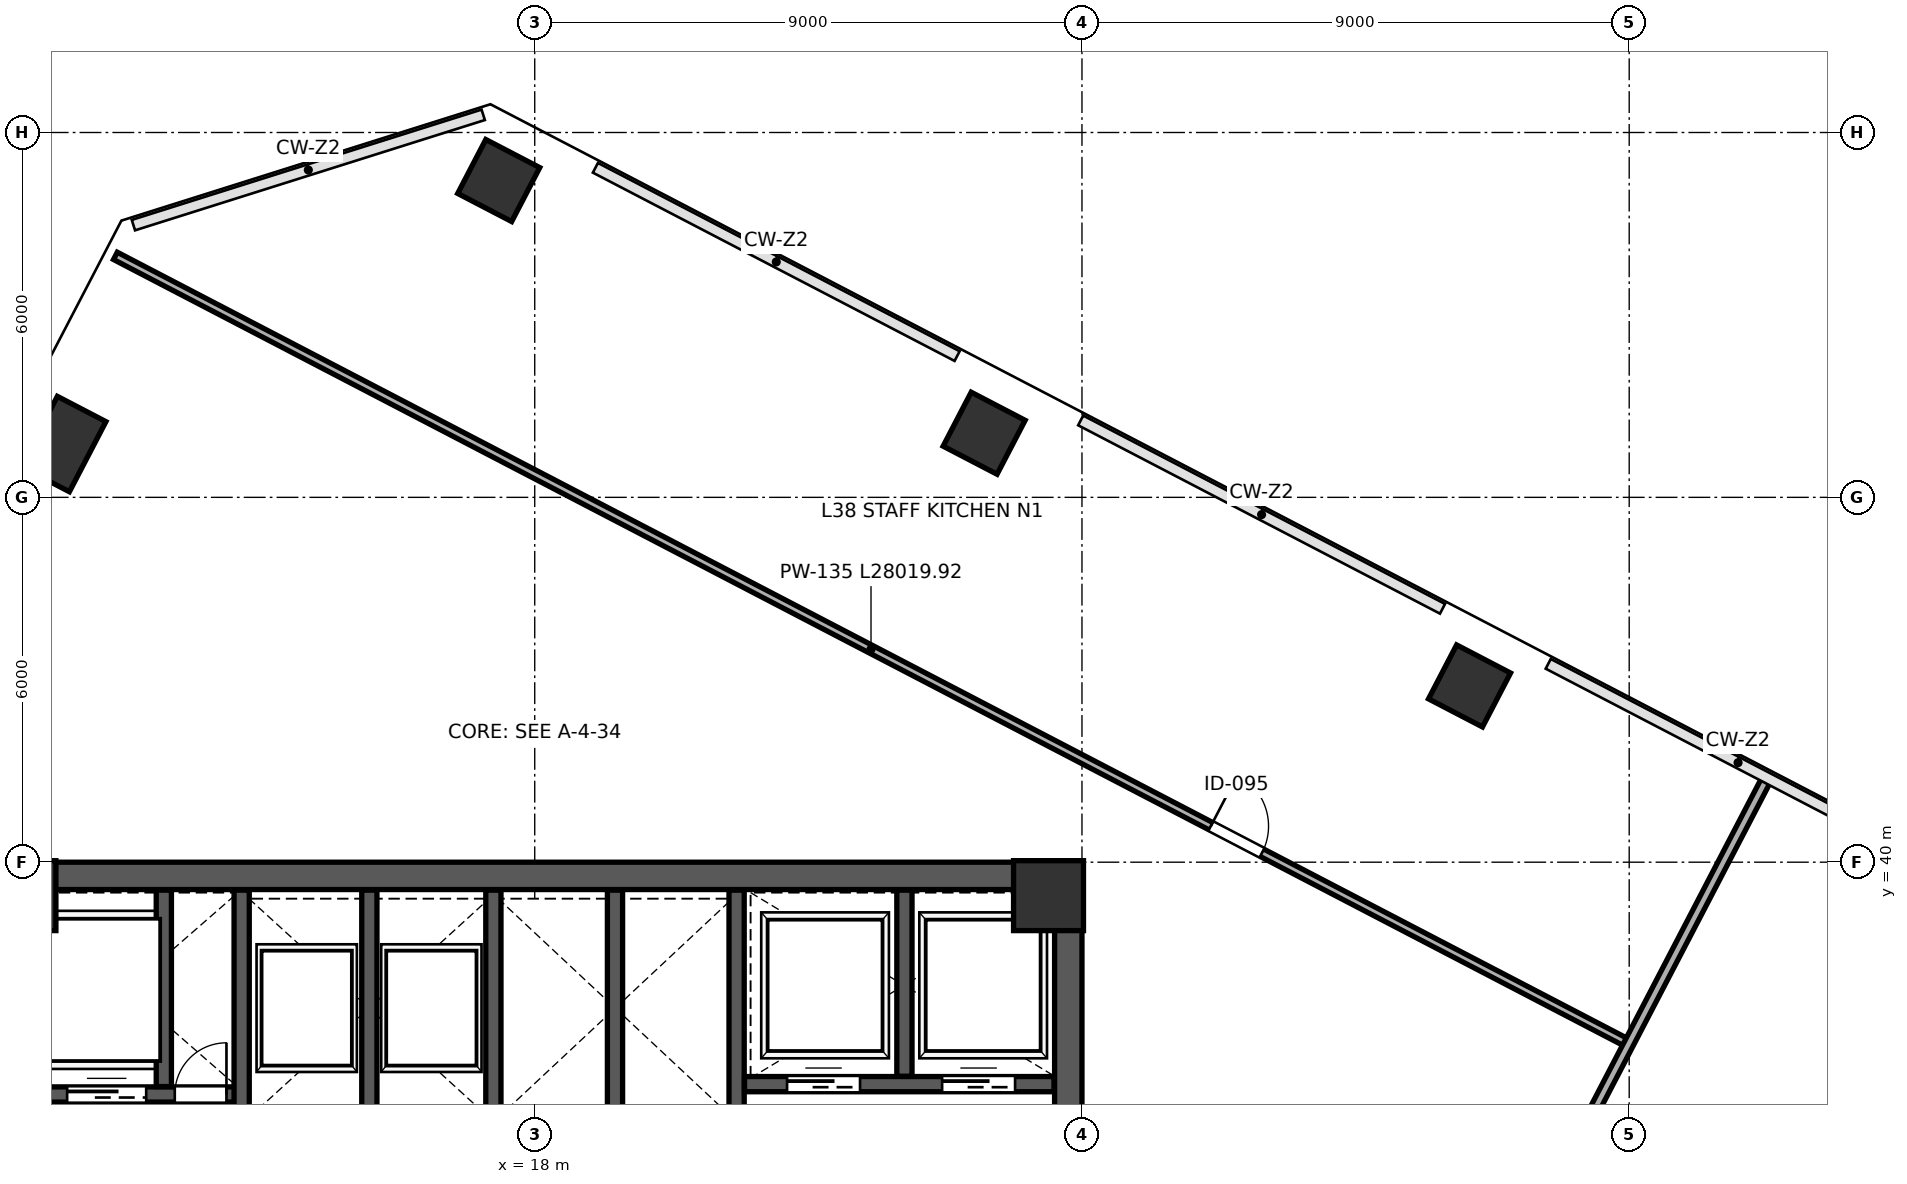
"""IFC4 building model, lengths in metres.
Left out: names, types, materials, properties, quantities, classifications, styles, units other than length and angle.
Written with IfcOpenShell. Run it as: python <this file> out.ifc"""

import sys

from ifc_helpers import new_model, si_unit, direction, frame, frame_2d, origin, origin_2d, place, context, subcontext, project, spatial, rectangle, extrude, clip, halfspace, source, transform, mapped, element, fill, save


model = new_model("IFC4")
c1 = context("Model", 3, precision=1e-05, world=origin(), true_north=direction((0.0, 1.0)))
c2 = subcontext(c1, "Body", "Model", "MODEL_VIEW")
j1 = project(units=[si_unit("LENGTHUNIT", "METRE"), si_unit("PLANEANGLEUNIT", "RADIAN")], contexts=[c1])
p1 = place(None, origin())
s1 = spatial("IfcSite", under=j1, at=p1, CompositionType="ELEMENT")
p2 = place(p1, origin())
s2 = spatial("IfcBuilding", under=s1, at=p2, CompositionType="ELEMENT")
p3 = place(p2, frame((0.0, 0.0, 170.8)))
s3 = spatial("IfcBuildingStorey", under=s2, at=p3, CompositionType="ELEMENT", Elevation=170.8)
m1 = source(origin(), c2, "Body", "SweptSolid", [
    extrude(rectangle(XDim=1.15, YDim=1.15, at=origin_2d()), origin(), (0.0, 0.0, 1.0), 4.198),
])
for number, where, z_axis, x_axis in (
    (1, (9.55, 39.45, 0.001), (0.0, 0.0, 1.0), (1.0, 0.0, 0.0)),
    (2, (26.45, 39.45, 0.001), (0.0, 0.0, 1.0), (1.0, 0.0, 0.0)),
):
    element("IfcColumn", number, at=place(p3, frame(where, z_axis=z_axis, x_axis=x_axis)), inside=s3, PredefinedType="COLUMN", context=c2, shape_type="MappedRepresentation", body=[
        mapped(m1, transform((0.0, 0.0, 0.0), scale=1.0)),
    ])
p4 = place(p3, frame((17.408, 51.21, 0.0), z_axis=(0.099466506069, 0.020066789306, 0.994838548779), x_axis=(-0.274877965566, -0.960336826175, 0.046853861504)))
e3 = element("IfcColumn", 3, at=p4, inside=s3, PredefinedType="COLUMN", context=c2, shape_type="Clipping", body=[
    clip(clip(extrude(rectangle(XDim=1.0, YDim=1.0, at=origin_2d()), origin(), (0.0, 0.0, 1.0), 4.222), halfspace(frame((0.0, 0.0, 0.07), z_axis=(0.0, 0.0, -1.0), x_axis=(1.0, 0.0, 0.0)), False)), halfspace(frame((0.0, 0.0, 4.152), z_axis=(0.0, 0.0, 1.0), x_axis=(1.0, 0.0, 0.0)), False)),
])
p5 = place(p3, frame((25.391, 47.054, 0.0), z_axis=(0.07769866338, -0.020974583254, 0.996756231265), x_axis=(-0.675517121547, -0.736407253152, 0.037161485459)))
e4 = element("IfcColumn", 4, at=p5, inside=s3, PredefinedType="COLUMN", context=c2, shape_type="Clipping", body=[
    clip(clip(extrude(rectangle(XDim=1.0, YDim=1.0, at=origin_2d()), origin(), (0.0, 0.0, 1.0), 4.214), halfspace(frame((0.0, 0.0, 0.055), z_axis=(0.0, 0.0, -1.0), x_axis=(1.0, 0.0, 0.0)), False)), halfspace(frame((0.0, 0.0, 4.158), z_axis=(0.0, 0.0, 1.0), x_axis=(1.0, 0.0, 0.0)), False)),
])
p6 = place(p3, frame((33.374, 42.899, 0.0), z_axis=(0.055725496021, -0.062097434235, 0.996513210025), x_axis=(-0.96748864065, -0.2499629432, 0.038526059245)))
e5 = element("IfcColumn", 5, at=p6, inside=s3, PredefinedType="COLUMN", context=c2, shape_type="Clipping", body=[
    clip(clip(extrude(rectangle(XDim=1.0, YDim=1.0, at=origin_2d()), origin(), (0.0, 0.0, 1.0), 4.215), halfspace(frame((0.0, 0.0, 0.057), z_axis=(0.0, 0.0, -1.0), x_axis=(1.0, 0.0, 0.0)), False)), halfspace(frame((0.0, 0.0, 4.157), z_axis=(0.0, 0.0, 1.0), x_axis=(1.0, 0.0, 0.0)), False)),
])
p7 = place(p3, frame((10.248, 46.877, 0.0), z_axis=(0.077588163399, 0.057279852174, 0.995338683783), x_axis=(0.157076232166, -0.986581975739, 0.044531589179)))
e6 = element("IfcColumn", 6, at=p7, inside=s3, PredefinedType="PILASTER", context=c2, shape_type="Clipping", body=[
    clip(clip(extrude(rectangle(XDim=0.9, YDim=1.3, at=origin_2d()), origin(), (0.0, 0.0, 1.0), 4.22), halfspace(frame((0.0, 0.0, 0.077), z_axis=(0.0, 0.0, -1.0), x_axis=(1.0, 0.0, 0.0)), False)), halfspace(frame((0.0, 0.0, 4.143), z_axis=(0.0, 0.0, 1.0), x_axis=(1.0, 0.0, 0.0)), False)),
])
p8 = place(p3, frame((26.775, 24.45, 0.0), z_axis=(0.0, 0.0, 1.0), x_axis=(0.0, 1.0, 0.0)))
e7 = element("IfcWall", 7, at=p8, inside=s3, PredefinedType="SHEAR", context=c2, shape_type="SweptSolid", body=[
    extrude(rectangle(XDim=15.1, YDim=0.45, at=frame_2d((7.55, 0.0))), origin(), (0.0, 0.0, 1.0), 3.96),
])
p9 = place(p8, frame((8.6, 0.0, 0.0)))
e8 = element("IfcOpeningElement", 8, at=p9, cuts=e7, PredefinedType="OPENING", context=c2, shape_type="SweptSolid", body=[
    extrude(rectangle(XDim=1.15, YDim=2.2, at=frame_2d((0.575, 1.1))), frame((0.0, 0.235, 0.0), z_axis=(0.0, -1.0, 0.0), x_axis=(1.0, 0.0, 0.0)), (0.0, 0.0, 1.0), 0.47),
])
p10 = place(p3, frame((9.0, 39.775, 0.0), z_axis=(0.0, 0.0, 1.0), x_axis=(1.0, 0.0, 0.0)))
e9 = element("IfcWall", 9, at=p10, inside=s3, PredefinedType="SHEAR", context=c2, shape_type="SweptSolid", body=[
    extrude(rectangle(XDim=18.0, YDim=0.45, at=frame_2d((9.0, 0.0))), origin(), (0.0, 0.0, 1.0), 3.96),
])
p11 = place(p3, frame((21.32, 32.12, 0.0), z_axis=(0.0, 0.0, 1.0), x_axis=(0.0, 1.0, 0.0)))
e10 = element("IfcWall", 10, at=p11, inside=s3, PredefinedType="SHEAR", context=c2, shape_type="SweptSolid", body=[
    extrude(rectangle(XDim=7.42, YDim=0.25, at=frame_2d((3.71, 0.0))), origin(), (0.0, 0.0, 1.0), 3.96),
])
p12 = place(p11, frame((1.4, 0.0, 0.0)))
e11 = element("IfcOpeningElement", 11, at=p12, cuts=e10, PredefinedType="OPENING", context=c2, shape_type="SweptSolid", body=[
    extrude(rectangle(XDim=1.15, YDim=2.2, at=frame_2d((0.575, 1.1))), frame((0.0, 0.135, 0.0), z_axis=(0.0, -1.0, 0.0), x_axis=(1.0, 0.0, 0.0)), (0.0, 0.0, 1.0), 0.27),
])
p13 = place(p3, frame((9.46, 36.18, 0.0), z_axis=(0.0, 0.0, 1.0), x_axis=(1.0, 0.0, 0.0)))
e12 = element("IfcWall", 12, at=p13, inside=s3, PredefinedType="SHEAR", context=c2, shape_type="SweptSolid", body=[
    extrude(rectangle(XDim=3.79, YDim=0.25, at=frame_2d((1.895, 0.0))), origin(), (0.0, 0.0, 1.0), 3.96),
])
p14 = place(p13, frame((2.62, 0.0, 0.0)))
e13 = element("IfcOpeningElement", 13, at=p14, cuts=e12, PredefinedType="OPENING", context=c2, shape_type="SweptSolid", body=[
    extrude(rectangle(XDim=0.85, YDim=2.1, at=frame_2d((0.425, 1.05))), frame((0.0, 0.135, 0.0), z_axis=(0.0, -1.0, 0.0), x_axis=(1.0, 0.0, 0.0)), (0.0, 0.0, 1.0), 0.27),
])
p15 = place(p13, frame((0.85, 0.0, 0.0)))
e14 = element("IfcOpeningElement", 14, at=p15, cuts=e12, PredefinedType="OPENING", context=c2, shape_type="SweptSolid", body=[
    extrude(rectangle(XDim=1.3, YDim=2.25, at=frame_2d((0.65, 1.125))), frame((0.0, 0.135, 0.0), z_axis=(0.0, -1.0, 0.0), x_axis=(1.0, 0.0, 0.0)), (0.0, 0.0, 1.0), 0.27),
])
p16 = place(p3, frame((11.9, 36.31, 0.0), z_axis=(0.0, 0.0, 1.0), x_axis=(0.0, 1.0, 0.0)))
e15 = element("IfcWall", 15, at=p16, inside=s3, PredefinedType="SHEAR", context=c2, shape_type="SweptSolid", body=[
    extrude(rectangle(XDim=3.23, YDim=0.25, at=frame_2d((1.615, 0.0))), origin(), (0.0, 0.0, 1.0), 3.96),
])
p17 = place(p3, frame((21.45, 36.35, 0.0), z_axis=(0.0, 0.0, 1.0), x_axis=(1.0, 0.0, 0.0)))
e16 = element("IfcWall", 16, at=p17, inside=s3, PredefinedType="SHEAR", context=c2, shape_type="SweptSolid", body=[
    extrude(rectangle(XDim=5.09, YDim=0.25, at=frame_2d((2.545, 0.0))), origin(), (0.0, 0.0, 1.0), 3.96),
])
p18 = place(p17, frame((0.7, 0.0, 0.0)))
e17 = element("IfcOpeningElement", 17, at=p18, cuts=e16, PredefinedType="OPENING", context=c2, shape_type="SweptSolid", body=[
    extrude(rectangle(XDim=1.2, YDim=2.2, at=frame_2d((0.6, 1.1))), frame((0.0, 0.135, 0.0), z_axis=(0.0, -1.0, 0.0), x_axis=(1.0, 0.0, 0.0)), (0.0, 0.0, 1.0), 0.27),
])
p19 = place(p17, frame((3.25, 0.0, 0.0)))
e18 = element("IfcOpeningElement", 18, at=p19, cuts=e16, PredefinedType="OPENING", context=c2, shape_type="SweptSolid", body=[
    extrude(rectangle(XDim=1.2, YDim=2.2, at=frame_2d((0.6, 1.1))), frame((0.0, 0.135, 0.0), z_axis=(0.0, -1.0, 0.0), x_axis=(1.0, 0.0, 0.0)), (0.0, 0.0, 1.0), 0.27),
])
p20 = place(p3, frame((24.08, 36.48, 0.0), z_axis=(0.0, 0.0, 1.0), x_axis=(0.0, 1.0, 0.0)))
e19 = element("IfcWall", 19, at=p20, inside=s3, PredefinedType="SHEAR", context=c2, shape_type="SweptSolid", body=[
    extrude(rectangle(XDim=3.06, YDim=0.25, at=frame_2d((1.53, 0.0))), origin(), (0.0, 0.0, 1.0), 3.96),
])
for number, where, z_axis, x_axis in (
    (20, (13.18, 35.81, 0.0), (0.0, 0.0, 1.0), (0.0, 1.0, 0.0)),
    (21, (15.28, 35.81, 0.0), (0.0, 0.0, 1.0), (0.0, 1.0, 0.0)),
    (22, (17.32, 35.81, 0.0), (0.0, 0.0, 1.0), (0.0, 1.0, 0.0)),
    (23, (19.32, 35.81, 0.0), (0.0, 0.0, 1.0), (0.0, 1.0, 0.0)),
):
    element("IfcWall", number, at=place(p3, frame(where, z_axis=z_axis, x_axis=x_axis)), inside=s3, PredefinedType="SHEAR", context=c2, shape_type="SweptSolid", body=[
        extrude(rectangle(XDim=3.73, YDim=0.25, at=frame_2d((1.865, 0.0))), origin(), (0.0, 0.0, 1.0), 3.96),
    ])
p21 = place(p3, frame((11.104, 49.971, 0.0), z_axis=(0.0, 0.0, 1.0), x_axis=(0.887010001249, -0.461750211353, 0.0)))
e24 = element("IfcWall", 24, at=p21, inside=s3, PredefinedType="PARTITIONING", context=c2, shape_type="SweptSolid", body=[
    extrude(rectangle(XDim=28.02, YDim=0.135, at=frame_2d((14.01, 0.0))), origin(), (0.0, 0.0, 1.0), 3.96),
])
p22 = place(p21, frame((20.31, 0.0, 0.0)))
e25 = element("IfcOpeningElement", 25, at=p22, cuts=e24, PredefinedType="OPENING", context=c2, shape_type="SweptSolid", body=[
    extrude(rectangle(XDim=0.95, YDim=2.15, at=frame_2d((0.475, 1.075))), frame((0.0, 0.078, 0.0), z_axis=(0.0, -1.0, 0.0), x_axis=(1.0, 0.0, 0.0)), (0.0, 0.0, 1.0), 0.155),
])
p23 = place(p3, frame((29.593, 24.72, 0.0), z_axis=(0.0, 0.0, 1.0), x_axis=(0.461745249096, 0.88701258443, 0.0)))
e26 = element("IfcWall", 26, at=p23, inside=s3, PredefinedType="PARTITIONING", context=c2, shape_type="SweptSolid", body=[
    extrude(rectangle(XDim=18.74, YDim=0.16, at=frame_2d((9.37, 0.0))), origin(), (0.0, 0.0, 1.0), 3.195),
])
m2 = source(origin(), c2, "Body", "SweptSolid", [
    extrude(rectangle(XDim=0.85, YDim=2.1, at=frame_2d((0.425, 1.05))), frame((0.0, 0.025, 0.0), z_axis=(0.0, -1.0, 0.0), x_axis=(1.0, 0.0, 0.0)), (0.0, 0.0, 1.0), 0.05),
])
p24 = place(p14, origin())
e27 = element("IfcDoor", 27, at=p24, inside=s3, OperationType="SINGLE_SWING_RIGHT", PredefinedType="DOOR", context=c2, shape_type="MappedRepresentation", body=[
    mapped(m2, transform((0.0, 0.0, 0.0), scale=1.0)),
])
fill(e13, e27)
m3 = source(origin(), c2, "Body", "SweptSolid", [
    extrude(rectangle(XDim=1.2, YDim=2.2, at=frame_2d((0.6, 1.1))), frame((0.0, 0.025, 0.0), z_axis=(0.0, -1.0, 0.0), x_axis=(1.0, 0.0, 0.0)), (0.0, 0.0, 1.0), 0.05),
])
p25 = place(p18, origin())
e28 = element("IfcDoor", 28, at=p25, inside=s3, OperationType="SLIDING_TO_LEFT", PredefinedType="DOOR", context=c2, shape_type="MappedRepresentation", body=[
    mapped(m3, transform((0.0, 0.0, 0.0), scale=1.0)),
])
fill(e17, e28)
p26 = place(p19, origin())
e29 = element("IfcDoor", 29, at=p26, inside=s3, OperationType="SLIDING_TO_RIGHT", PredefinedType="DOOR", context=c2, shape_type="MappedRepresentation", body=[
    mapped(m3, transform((0.0, 0.0, 0.0), scale=1.0)),
])
fill(e18, e29)
m4 = source(origin(), c2, "Body", "SweptSolid", [
    extrude(rectangle(XDim=1.3, YDim=2.25, at=frame_2d((0.65, 1.125))), frame((0.0, 0.025, 0.0), z_axis=(0.0, -1.0, 0.0), x_axis=(1.0, 0.0, 0.0)), (0.0, 0.0, 1.0), 0.05),
])
p27 = place(p15, origin())
e30 = element("IfcDoor", 30, at=p27, inside=s3, OperationType="SLIDING_TO_LEFT", PredefinedType="DOOR", context=c2, shape_type="MappedRepresentation", body=[
    mapped(m4, transform((0.0, 0.0, 0.0), scale=1.0)),
])
fill(e14, e30)
m5 = source(origin(), c2, "Body", "SweptSolid", [
    extrude(rectangle(XDim=0.95, YDim=2.15, at=frame_2d((0.475, 1.075))), frame((0.0, 0.025, 0.0), z_axis=(0.0, -1.0, 0.0), x_axis=(1.0, 0.0, 0.0)), (0.0, 0.0, 1.0), 0.05),
])
p28 = place(p22, origin())
e31 = element("IfcDoor", 31, at=p28, inside=s3, OperationType="SINGLE_SWING_LEFT", PredefinedType="DOOR", context=c2, shape_type="MappedRepresentation", body=[
    mapped(m5, transform((0.0, 0.0, 0.0), scale=1.0)),
])
fill(e25, e31)
save(model, sys.argv[1])
